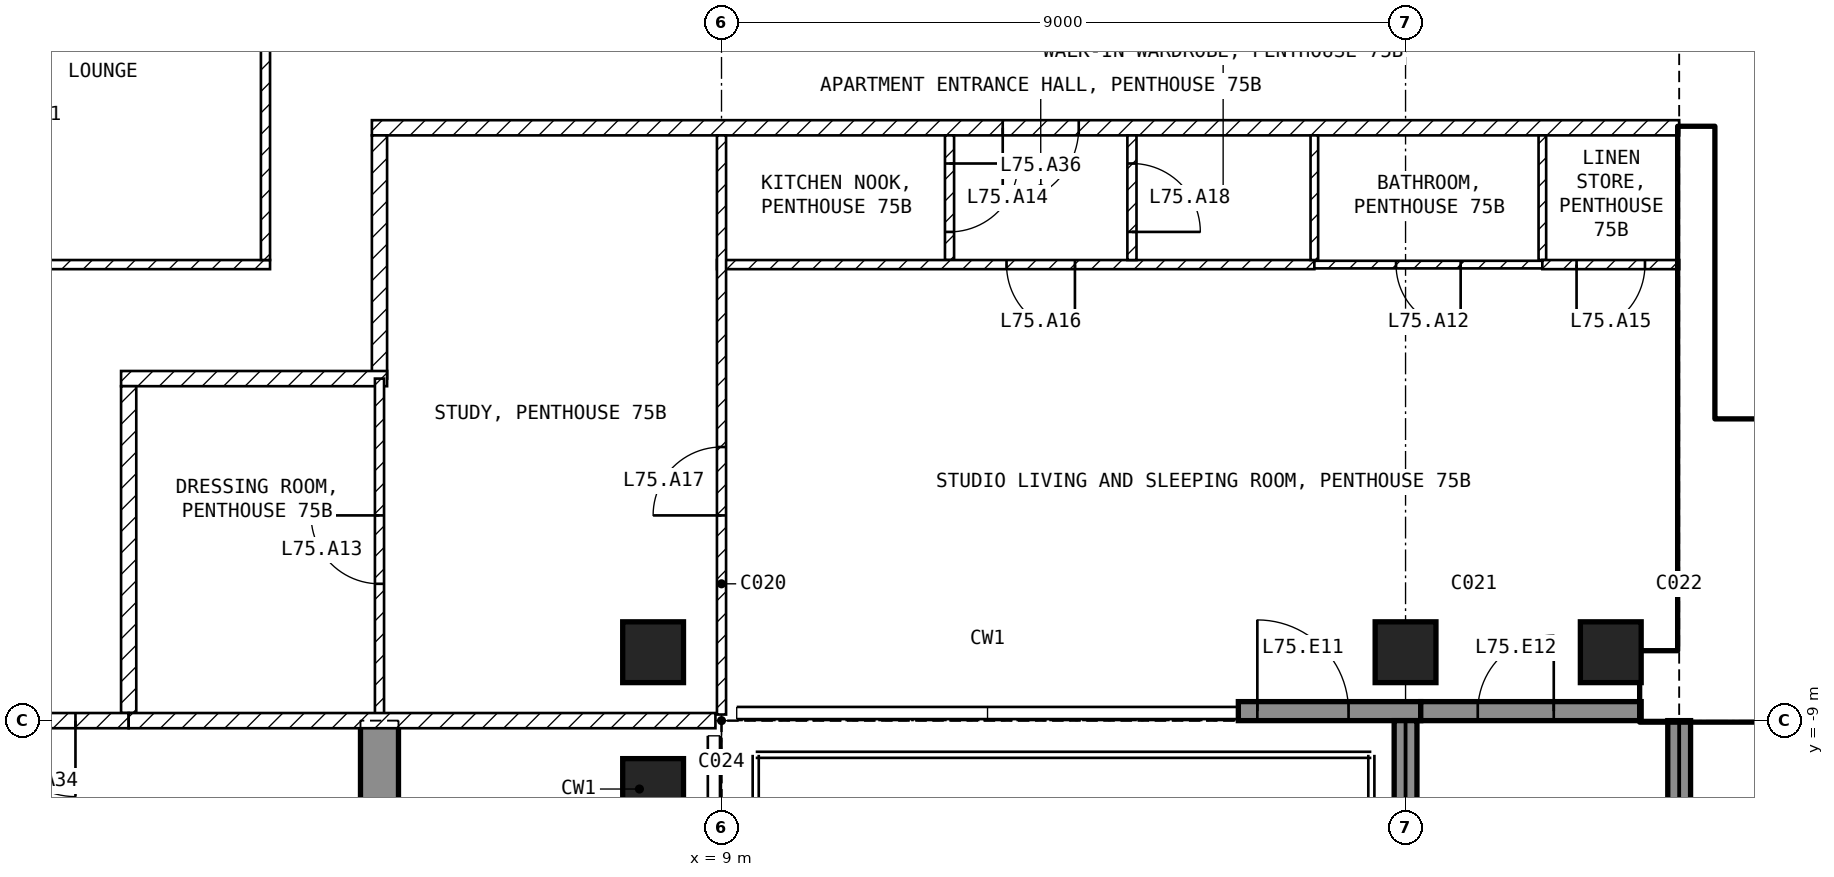
"""IFC4 building model, lengths in metres.
Left out: names, types, materials, properties, quantities, classifications, styles, units other than length and angle.
Written with IfcOpenShell. Run it as: python <this file> out.ifc"""

import sys

from ifc_helpers import new_model, si_unit, direction, frame, frame_2d, origin, origin_2d, place, context, subcontext, project, spatial, polyline, rectangle, outline, extrude, element, fill, save


model = new_model("IFC4")
c1 = context("Model", 3, precision=1e-05, world=origin(), true_north=direction((0.0, 1.0)))
c2 = subcontext(c1, "Body", "Model", "MODEL_VIEW")
j1 = project(units=[si_unit("LENGTHUNIT", "METRE"), si_unit("PLANEANGLEUNIT", "RADIAN")], contexts=[c1])
p1 = place(None, origin())
s1 = spatial("IfcSite", under=j1, at=p1, CompositionType="ELEMENT")
p2 = place(p1, origin())
s2 = spatial("IfcBuilding", under=s1, at=p2, CompositionType="ELEMENT")
p3 = place(p2, frame((0.0, 0.0, 294.6)))
s3 = spatial("IfcBuildingStorey", under=s2, at=p3, CompositionType="ELEMENT", Elevation=294.6)
for number, where, z_axis, x_axis in (
    (1, (8.1, -9.9, -0.25), (0.0, 0.0, 1.0), (1.0, 0.0, 0.0)),
    (2, (8.1, -8.1, -0.25), (0.0, 0.0, 1.0), (1.0, 0.0, 0.0)),
    (3, (18.0, -8.1, -0.25), (0.0, 0.0, 1.0), (1.0, 0.0, 0.0)),
    (4, (20.7, -8.1, -0.25), (0.0, 0.0, 1.0), (1.0, 0.0, 0.0)),
):
    element("IfcColumn", number, at=place(p3, frame(where, z_axis=z_axis, x_axis=x_axis)), inside=s3, PredefinedType="COLUMN", context=c2, shape_type="SweptSolid", body=[
        extrude(rectangle(XDim=0.8, YDim=0.8, at=origin_2d()), origin(), (0.0, 0.0, 1.0), 4.2),
    ])
p4 = place(p3, frame((4.25, -13.1, -0.25), z_axis=(1.0, 0.0, 0.0), x_axis=(0.0, 1.0, 0.0)))
e5 = element("IfcWall", 5, at=p4, inside=s3, PredefinedType="SHEAR", context=c2, shape_type="SweptSolid", body=[
    extrude(outline(polyline([(0.0, 0.0), (4.1, 0.0), (4.1, 4.2), (0.0, 4.2), (0.0, 0.0)])), origin(), (0.0, 0.0, 1.0), 0.5),
])
p5 = place(p3, frame((15.8, -8.875, 0.0), z_axis=(0.0, 0.0, 1.0), x_axis=(1.0, 0.0, 0.0)))
e6 = element("IfcWall", 6, at=p5, inside=s3, PredefinedType="SOLIDWALL", context=c2, shape_type="SweptSolid", body=[
    extrude(rectangle(XDim=2.4, YDim=0.25, at=frame_2d((1.2, 0.0))), origin(), (0.0, 0.0, 1.0), 3.95),
])
p6 = place(p5, frame((0.25, 0.0, 0.0)))
e7 = element("IfcOpeningElement", 7, at=p6, cuts=e6, PredefinedType="OPENING", context=c2, shape_type="SweptSolid", body=[
    extrude(rectangle(XDim=1.2, YDim=2.4, at=frame_2d((0.6, 1.2))), frame((0.0, 0.135, 0.0), z_axis=(0.0, -1.0, 0.0), x_axis=(1.0, 0.0, 0.0)), (0.0, 0.0, 1.0), 0.27),
])
p7 = place(p3, frame((18.2, -8.875, 0.0), z_axis=(0.0, 0.0, 1.0), x_axis=(1.0, 0.0, 0.0)))
e8 = element("IfcWall", 8, at=p7, inside=s3, PredefinedType="SOLIDWALL", context=c2, shape_type="SweptSolid", body=[
    extrude(rectangle(XDim=2.9, YDim=0.25, at=frame_2d((1.45, 0.0))), origin(), (0.0, 0.0, 1.0), 3.95),
])
p8 = place(p7, frame((0.75, 0.0, 0.0)))
e9 = element("IfcOpeningElement", 9, at=p8, cuts=e8, PredefinedType="OPENING", context=c2, shape_type="SweptSolid", body=[
    extrude(rectangle(XDim=1.0, YDim=2.4, at=frame_2d((0.5, 1.2))), frame((0.0, 0.135, 0.0), z_axis=(0.0, -1.0, 0.0), x_axis=(1.0, 0.0, 0.0)), (0.0, 0.0, 1.0), 0.27),
])
p9 = place(p3, frame((18.0, -9.0, 0.0), z_axis=(0.0, 0.0, 1.0), x_axis=(0.0, -1.0, 0.0)))
e10 = element("IfcWall", 10, at=p9, inside=s3, PredefinedType="SOLIDWALL", context=c2, shape_type="SweptSolid", body=[
    extrude(rectangle(XDim=2.74, YDim=0.3, at=frame_2d((1.37, 0.0))), origin(), (0.0, 0.0, 1.0), 3.95),
])
p10 = place(p3, frame((21.6, -9.0, 0.0), z_axis=(0.0, 0.0, 1.0), x_axis=(0.0, -1.0, 0.0)))
e11 = element("IfcWall", 11, at=p10, inside=s3, PredefinedType="SOLIDWALL", context=c2, shape_type="SweptSolid", body=[
    extrude(rectangle(XDim=2.7, YDim=0.3, at=frame_2d((1.35, 0.0))), origin(), (0.0, 0.0, 1.0), 3.95),
])
p11 = place(p3, frame((21.1, -8.55, 0.0), z_axis=(0.0, 0.0, 1.0), x_axis=(1.0, 0.0, 0.0)))
e12 = element("IfcWall", 12, at=p11, inside=s3, PredefinedType="SHEAR", context=c2, shape_type="SweptSolid", body=[
    extrude(rectangle(XDim=9.1, YDim=0.9, at=frame_2d((4.55, 0.0))), origin(), (0.0, 0.0, 1.0), 3.95),
])
p12 = place(p3, frame((21.825, -8.1, 0.0), z_axis=(0.0, 0.0, 1.0), x_axis=(0.0, 1.0, 0.0)))
e13 = element("IfcWall", 13, at=p12, inside=s3, PredefinedType="SHEAR", context=c2, shape_type="SweptSolid", body=[
    extrude(rectangle(XDim=6.9, YDim=0.45, at=frame_2d((3.45, 0.0))), origin(), (0.0, 0.0, 1.0), 3.95),
])
p13 = place(p3, frame((22.05, -5.15, 0.0), z_axis=(0.0, 0.0, 1.0), x_axis=(1.0, 0.0, 0.0)))
e14 = element("IfcWall", 14, at=p13, inside=s3, PredefinedType="SOLIDWALL", context=c2, shape_type="SweptSolid", body=[
    extrude(rectangle(XDim=6.3, YDim=0.2, at=frame_2d((3.15, 0.0))), origin(), (0.0, 0.0, 1.0), 3.95),
])
p14 = place(p13, frame((0.2, 0.0, 0.0)))
e15 = element("IfcOpeningElement", 15, at=p14, cuts=e14, PredefinedType="OPENING", context=c2, shape_type="SweptSolid", body=[
    extrude(rectangle(XDim=1.0, YDim=2.1, at=frame_2d((0.5, 1.05))), frame((0.0, 0.11, 0.0), z_axis=(0.0, -1.0, 0.0), x_axis=(1.0, 0.0, 0.0)), (0.0, 0.0, 1.0), 0.22),
])
p15 = place(p3, frame((-3.06, -3.0, 0.0), z_axis=(0.0, 0.0, 1.0), x_axis=(1.0, 0.0, 0.0)))
e16 = element("IfcWall", 16, at=p15, inside=s3, PredefinedType="PARTITIONING", context=c2, shape_type="SweptSolid", body=[
    extrude(rectangle(XDim=6.12, YDim=0.12, at=frame_2d((3.06, 0.0))), origin(), (0.0, 0.0, 1.0), 3.95),
])
p16 = place(p3, frame((3.0, -2.94, 0.0), z_axis=(0.0, 0.0, 1.0), x_axis=(0.0, 1.0, 0.0)))
e17 = element("IfcWall", 17, at=p16, inside=s3, PredefinedType="PARTITIONING", context=c2, shape_type="SweptSolid", body=[
    extrude(rectangle(XDim=5.88, YDim=0.12, at=frame_2d((2.94, 0.0))), origin(), (0.0, 0.0, 1.0), 3.95),
])
p17 = place(p3, frame((21.6, -1.2, 0.0), z_axis=(0.0, 0.0, 1.0), x_axis=(-1.0, 0.0, 0.0)))
e18 = element("IfcWall", 18, at=p17, inside=s3, PredefinedType="PARTITIONING", context=c2, shape_type="SweptSolid", body=[
    extrude(rectangle(XDim=17.2, YDim=0.2, at=frame_2d((8.6, 0.0))), origin(), (0.0, 0.0, 1.0), 3.95),
])
p18 = place(p17, frame((7.9, 0.0, 0.0)))
e19 = element("IfcOpeningElement", 19, at=p18, cuts=e18, PredefinedType="OPENING", context=c2, shape_type="SweptSolid", body=[
    extrude(rectangle(XDim=1.0, YDim=2.1, at=frame_2d((0.5, 1.05))), frame((0.0, 0.11, 0.0), z_axis=(0.0, -1.0, 0.0), x_axis=(1.0, 0.0, 0.0)), (0.0, 0.0, 1.0), 0.22),
])
p19 = place(p3, frame((4.5, -1.3, 0.0), z_axis=(0.0, 0.0, 1.0), x_axis=(0.0, -1.0, 0.0)))
e20 = element("IfcWall", 20, at=p19, inside=s3, PredefinedType="PARTITIONING", context=c2, shape_type="SweptSolid", body=[
    extrude(rectangle(XDim=3.2, YDim=0.2, at=frame_2d((1.6, 0.0))), origin(), (0.0, 0.0, 1.0), 3.95),
])
p20 = place(p3, frame((4.6, -4.5, 0.0), z_axis=(0.0, 0.0, 1.0), x_axis=(-1.0, 0.0, 0.0)))
e21 = element("IfcWall", 21, at=p20, inside=s3, PredefinedType="PARTITIONING", context=c2, shape_type="SweptSolid", body=[
    extrude(rectangle(XDim=3.5, YDim=0.2, at=frame_2d((1.75, 0.0))), origin(), (0.0, 0.0, 1.0), 3.95),
])
p21 = place(p3, frame((1.2, -4.6, 0.0), z_axis=(0.0, 0.0, 1.0), x_axis=(0.0, -1.0, 0.0)))
e22 = element("IfcWall", 22, at=p21, inside=s3, PredefinedType="PARTITIONING", context=c2, shape_type="SweptSolid", body=[
    extrude(rectangle(XDim=4.3, YDim=0.2, at=frame_2d((2.15, 0.0))), origin(), (0.0, 0.0, 1.0), 3.95),
])
p22 = place(p3, frame((1.2, -9.0, 0.0), z_axis=(0.0, 0.0, 1.0), x_axis=(-1.0, 0.0, 0.0)))
e23 = element("IfcWall", 23, at=p22, inside=s3, PredefinedType="PARTITIONING", context=c2, shape_type="SweptSolid", body=[
    extrude(rectangle(XDim=2.4, YDim=0.2, at=frame_2d((1.2, 0.0))), origin(), (0.0, 0.0, 1.0), 3.95),
])
p23 = place(p22, frame((0.7, 0.0, 0.0)))
e24 = element("IfcOpeningElement", 24, at=p23, cuts=e23, PredefinedType="OPENING", context=c2, shape_type="SweptSolid", body=[
    extrude(rectangle(XDim=1.0, YDim=2.1, at=frame_2d((0.5, 1.05))), frame((0.0, 0.11, 0.0), z_axis=(0.0, -1.0, 0.0), x_axis=(1.0, 0.0, 0.0)), (0.0, 0.0, 1.0), 0.22),
])
p24 = place(p3, frame((12.0, -1.3, 0.0), z_axis=(0.0, 0.0, 1.0), x_axis=(0.0, -1.0, 0.0)))
e25 = element("IfcWall", 25, at=p24, inside=s3, PredefinedType="PARTITIONING", context=c2, shape_type="SweptSolid", body=[
    extrude(rectangle(XDim=1.64, YDim=0.12, at=frame_2d((0.82, 0.0))), origin(), (0.0, 0.0, 1.0), 3.95),
])
p25 = place(p24, frame((0.37, 0.0, 0.0)))
e26 = element("IfcOpeningElement", 26, at=p25, cuts=e25, PredefinedType="OPENING", context=c2, shape_type="SweptSolid", body=[
    extrude(rectangle(XDim=0.9, YDim=2.1, at=frame_2d((0.45, 1.05))), frame((0.0, 0.07, 0.0), z_axis=(0.0, -1.0, 0.0), x_axis=(1.0, 0.0, 0.0)), (0.0, 0.0, 1.0), 0.14),
])
p26 = place(p3, frame((16.8, -3.0, 0.0), z_axis=(0.0, 0.0, 1.0), x_axis=(-1.0, 0.0, 0.0)))
e27 = element("IfcWall", 27, at=p26, inside=s3, PredefinedType="PARTITIONING", context=c2, shape_type="SweptSolid", body=[
    extrude(rectangle(XDim=7.86, YDim=0.12, at=frame_2d((3.93, 0.0))), origin(), (0.0, 0.0, 1.0), 3.95),
])
p27 = place(p26, frame((3.15, 0.0, 0.0)))
e28 = element("IfcOpeningElement", 28, at=p27, cuts=e27, PredefinedType="OPENING", context=c2, shape_type="SweptSolid", body=[
    extrude(rectangle(XDim=0.9, YDim=2.1, at=frame_2d((0.45, 1.05))), frame((0.0, 0.07, 0.0), z_axis=(0.0, -1.0, 0.0), x_axis=(1.0, 0.0, 0.0)), (0.0, 0.0, 1.0), 0.14),
])
p28 = place(p3, frame((9.0, -8.92, 0.0), z_axis=(0.0, 0.0, 1.0), x_axis=(0.0, 1.0, 0.0)))
e29 = element("IfcWall", 29, at=p28, inside=s3, PredefinedType="PARTITIONING", context=c2, shape_type="SweptSolid", body=[
    extrude(rectangle(XDim=7.62, YDim=0.12, at=frame_2d((3.81, 0.0))), origin(), (0.0, 0.0, 1.0), 3.95),
])
p29 = place(p28, frame((2.62, 0.0, 0.0)))
e30 = element("IfcOpeningElement", 30, at=p29, cuts=e29, PredefinedType="OPENING", context=c2, shape_type="SweptSolid", body=[
    extrude(rectangle(XDim=0.9, YDim=2.1, at=frame_2d((0.45, 1.05))), frame((0.0, 0.07, 0.0), z_axis=(0.0, -1.0, 0.0), x_axis=(1.0, 0.0, 0.0)), (0.0, 0.0, 1.0), 0.14),
])
p30 = place(p3, frame((14.4, -1.3, 0.0), z_axis=(0.0, 0.0, 1.0), x_axis=(0.0, -1.0, 0.0)))
e31 = element("IfcWall", 31, at=p30, inside=s3, PredefinedType="PARTITIONING", context=c2, shape_type="SweptSolid", body=[
    extrude(rectangle(XDim=1.64, YDim=0.12, at=frame_2d((0.82, 0.0))), origin(), (0.0, 0.0, 1.0), 3.95),
])
p31 = place(p30, frame((0.37, 0.0, 0.0)))
e32 = element("IfcOpeningElement", 32, at=p31, cuts=e31, PredefinedType="OPENING", context=c2, shape_type="SweptSolid", body=[
    extrude(rectangle(XDim=0.9, YDim=2.1, at=frame_2d((0.45, 1.05))), frame((0.0, 0.07, 0.0), z_axis=(0.0, -1.0, 0.0), x_axis=(1.0, 0.0, 0.0)), (0.0, 0.0, 1.0), 0.14),
])
for number, where, z_axis, x_axis in (
    (33, (16.8, -1.3, 0.0), (0.0, 0.0, 1.0), (0.0, -1.0, 0.0)),
    (34, (19.8, -1.3, 0.0), (0.0, 0.0, 1.0), (0.0, -1.0, 0.0)),
):
    element("IfcWall", number, at=place(p3, frame(where, z_axis=z_axis, x_axis=x_axis)), inside=s3, PredefinedType="PARTITIONING", context=c2, shape_type="SweptSolid", body=[
        extrude(rectangle(XDim=1.64, YDim=0.1, at=frame_2d((0.82, 0.0))), origin(), (0.0, 0.0, 1.0), 3.95),
    ])
p32 = place(p3, frame((19.8, -3.0, 0.0), z_axis=(0.0, 0.0, 1.0), x_axis=(-1.0, 0.0, 0.0)))
e35 = element("IfcWall", 35, at=p32, inside=s3, PredefinedType="PARTITIONING", context=c2, shape_type="SweptSolid", body=[
    extrude(rectangle(XDim=3.0, YDim=0.1, at=frame_2d((1.5, 0.0))), origin(), (0.0, 0.0, 1.0), 3.95),
])
p33 = place(p32, frame((1.075, 0.0, 0.0)))
e36 = element("IfcOpeningElement", 36, at=p33, cuts=e35, PredefinedType="OPENING", context=c2, shape_type="SweptSolid", body=[
    extrude(rectangle(XDim=0.85, YDim=2.1, at=frame_2d((0.425, 1.05))), frame((0.0, 0.06, 0.0), z_axis=(0.0, -1.0, 0.0), x_axis=(1.0, 0.0, 0.0)), (0.0, 0.0, 1.0), 0.12),
])
p34 = place(p3, frame((21.6, -3.0, 0.0), z_axis=(0.0, 0.0, 1.0), x_axis=(-1.0, 0.0, 0.0)))
e37 = element("IfcWall", 37, at=p34, inside=s3, PredefinedType="PARTITIONING", context=c2, shape_type="SweptSolid", body=[
    extrude(rectangle(XDim=1.8, YDim=0.12, at=frame_2d((0.9, 0.0))), origin(), (0.0, 0.0, 1.0), 3.95),
])
p35 = place(p34, frame((0.45, 0.0, 0.0)))
e38 = element("IfcOpeningElement", 38, at=p35, cuts=e37, PredefinedType="OPENING", context=c2, shape_type="SweptSolid", body=[
    extrude(rectangle(XDim=0.9, YDim=2.1, at=frame_2d((0.45, 1.05))), frame((0.0, 0.07, 0.0), z_axis=(0.0, -1.0, 0.0), x_axis=(1.0, 0.0, 0.0)), (0.0, 0.0, 1.0), 0.14),
])
p36 = place(p3, frame((4.5, -9.0, 0.0), z_axis=(0.0, 0.0, 1.0), x_axis=(0.0, 1.0, 0.0)))
e39 = element("IfcWall", 39, at=p36, inside=s3, PredefinedType="PARTITIONING", context=c2, shape_type="SweptSolid", body=[
    extrude(rectangle(XDim=4.5, YDim=0.12, at=frame_2d((2.25, 0.0))), origin(), (0.0, 0.0, 1.0), 3.95),
])
p37 = place(p36, frame((1.8, 0.0, 0.0)))
e40 = element("IfcOpeningElement", 40, at=p37, cuts=e39, PredefinedType="OPENING", context=c2, shape_type="SweptSolid", body=[
    extrude(rectangle(XDim=0.9, YDim=2.1, at=frame_2d((0.45, 1.05))), frame((0.0, 0.07, 0.0), z_axis=(0.0, -1.0, 0.0), x_axis=(1.0, 0.0, 0.0)), (0.0, 0.0, 1.0), 0.14),
])
p38 = place(p3, frame((8.92, -9.0, 0.0), z_axis=(0.0, 0.0, 1.0), x_axis=(-1.0, 0.0, 0.0)))
e41 = element("IfcWall", 41, at=p38, inside=s3, PredefinedType="PARTITIONING", context=c2, shape_type="SweptSolid", body=[
    extrude(rectangle(XDim=7.72, YDim=0.2, at=frame_2d((3.86, 0.0))), origin(), (0.0, 0.0, 1.0), 3.95),
])
p39 = place(p6, origin())
e42 = element("IfcDoor", 42, at=p39, inside=s3, OperationType="SINGLE_SWING_LEFT", PredefinedType="DOOR", context=c2, shape_type="SweptSolid", body=[
    extrude(rectangle(XDim=1.2, YDim=2.4, at=frame_2d((0.6, 1.2))), frame((0.0, 0.025, 0.0), z_axis=(0.0, -1.0, 0.0), x_axis=(1.0, 0.0, 0.0)), (0.0, 0.0, 1.0), 0.05),
])
fill(e7, e42)
p40 = place(p8, origin())
e43 = element("IfcDoor", 43, at=p40, inside=s3, OperationType="SINGLE_SWING_RIGHT", PredefinedType="DOOR", context=c2, shape_type="SweptSolid", body=[
    extrude(rectangle(XDim=1.0, YDim=2.4, at=frame_2d((0.5, 1.2))), frame((0.0, 0.025, 0.0), z_axis=(0.0, -1.0, 0.0), x_axis=(1.0, 0.0, 0.0)), (0.0, 0.0, 1.0), 0.05),
])
fill(e9, e43)
p41 = place(p14, origin())
e44 = element("IfcDoor", 44, at=p41, inside=s3, OperationType="SINGLE_SWING_LEFT", PredefinedType="DOOR", context=c2, shape_type="SweptSolid", body=[
    extrude(rectangle(XDim=1.0, YDim=2.1, at=frame_2d((0.5, 1.05))), frame((0.0, 0.025, 0.0), z_axis=(0.0, -1.0, 0.0), x_axis=(1.0, 0.0, 0.0)), (0.0, 0.0, 1.0), 0.05),
])
fill(e15, e44)
p42 = place(p33, origin())
e45 = element("IfcDoor", 45, at=p42, inside=s3, OperationType="SINGLE_SWING_LEFT", PredefinedType="DOOR", context=c2, shape_type="SweptSolid", body=[
    extrude(rectangle(XDim=0.85, YDim=2.1, at=frame_2d((0.425, 1.05))), frame((0.0, 0.025, 0.0), z_axis=(0.0, -1.0, 0.0), x_axis=(1.0, 0.0, 0.0)), (0.0, 0.0, 1.0), 0.05),
])
fill(e36, e45)
p43 = place(p37, origin())
e46 = element("IfcDoor", 46, at=p43, inside=s3, OperationType="SINGLE_SWING_RIGHT", PredefinedType="DOOR", context=c2, shape_type="SweptSolid", body=[
    extrude(rectangle(XDim=0.9, YDim=2.1, at=frame_2d((0.45, 1.05))), frame((0.0, 0.025, 0.0), z_axis=(0.0, -1.0, 0.0), x_axis=(1.0, 0.0, 0.0)), (0.0, 0.0, 1.0), 0.05),
])
fill(e40, e46)
p44 = place(p25, origin())
e47 = element("IfcDoor", 47, at=p44, inside=s3, OperationType="SINGLE_SWING_LEFT", PredefinedType="DOOR", context=c2, shape_type="SweptSolid", body=[
    extrude(rectangle(XDim=0.9, YDim=2.1, at=frame_2d((0.45, 1.05))), frame((0.0, 0.025, 0.0), z_axis=(0.0, -1.0, 0.0), x_axis=(1.0, 0.0, 0.0)), (0.0, 0.0, 1.0), 0.05),
])
fill(e26, e47)
p45 = place(p35, origin())
e48 = element("IfcDoor", 48, at=p45, inside=s3, OperationType="SINGLE_SWING_RIGHT", PredefinedType="DOOR", context=c2, shape_type="SweptSolid", body=[
    extrude(rectangle(XDim=0.9, YDim=2.1, at=frame_2d((0.45, 1.05))), frame((0.0, 0.025, 0.0), z_axis=(0.0, -1.0, 0.0), x_axis=(1.0, 0.0, 0.0)), (0.0, 0.0, 1.0), 0.05),
])
fill(e38, e48)
p46 = place(p27, origin())
e49 = element("IfcDoor", 49, at=p46, inside=s3, OperationType="SINGLE_SWING_LEFT", PredefinedType="DOOR", context=c2, shape_type="SweptSolid", body=[
    extrude(rectangle(XDim=0.9, YDim=2.1, at=frame_2d((0.45, 1.05))), frame((0.0, 0.025, 0.0), z_axis=(0.0, -1.0, 0.0), x_axis=(1.0, 0.0, 0.0)), (0.0, 0.0, 1.0), 0.05),
])
fill(e28, e49)
p47 = place(p29, origin())
e50 = element("IfcDoor", 50, at=p47, inside=s3, OperationType="SINGLE_SWING_LEFT", PredefinedType="DOOR", context=c2, shape_type="SweptSolid", body=[
    extrude(rectangle(XDim=0.9, YDim=2.1, at=frame_2d((0.45, 1.05))), frame((0.0, 0.025, 0.0), z_axis=(0.0, -1.0, 0.0), x_axis=(1.0, 0.0, 0.0)), (0.0, 0.0, 1.0), 0.05),
])
fill(e30, e50)
p48 = place(p31, origin())
e51 = element("IfcDoor", 51, at=p48, inside=s3, OperationType="SINGLE_SWING_RIGHT", PredefinedType="DOOR", context=c2, shape_type="SweptSolid", body=[
    extrude(rectangle(XDim=0.9, YDim=2.1, at=frame_2d((0.45, 1.05))), frame((0.0, 0.025, 0.0), z_axis=(0.0, -1.0, 0.0), x_axis=(1.0, 0.0, 0.0)), (0.0, 0.0, 1.0), 0.05),
])
fill(e32, e51)
p49 = place(p23, origin())
e52 = element("IfcDoor", 52, at=p49, inside=s3, OperationType="SINGLE_SWING_LEFT", PredefinedType="DOOR", context=c2, shape_type="SweptSolid", body=[
    extrude(rectangle(XDim=1.0, YDim=2.1, at=frame_2d((0.5, 1.05))), frame((0.0, 0.025, 0.0), z_axis=(0.0, -1.0, 0.0), x_axis=(1.0, 0.0, 0.0)), (0.0, 0.0, 1.0), 0.05),
])
fill(e24, e52)
p50 = place(p18, origin())
e53 = element("IfcDoor", 53, at=p50, inside=s3, OperationType="SINGLE_SWING_RIGHT", PredefinedType="DOOR", context=c2, shape_type="SweptSolid", body=[
    extrude(rectangle(XDim=1.0, YDim=2.1, at=frame_2d((0.5, 1.05))), frame((0.0, 0.025, 0.0), z_axis=(0.0, -1.0, 0.0), x_axis=(1.0, 0.0, 0.0)), (0.0, 0.0, 1.0), 0.05),
])
fill(e19, e53)
save(model, sys.argv[1])
